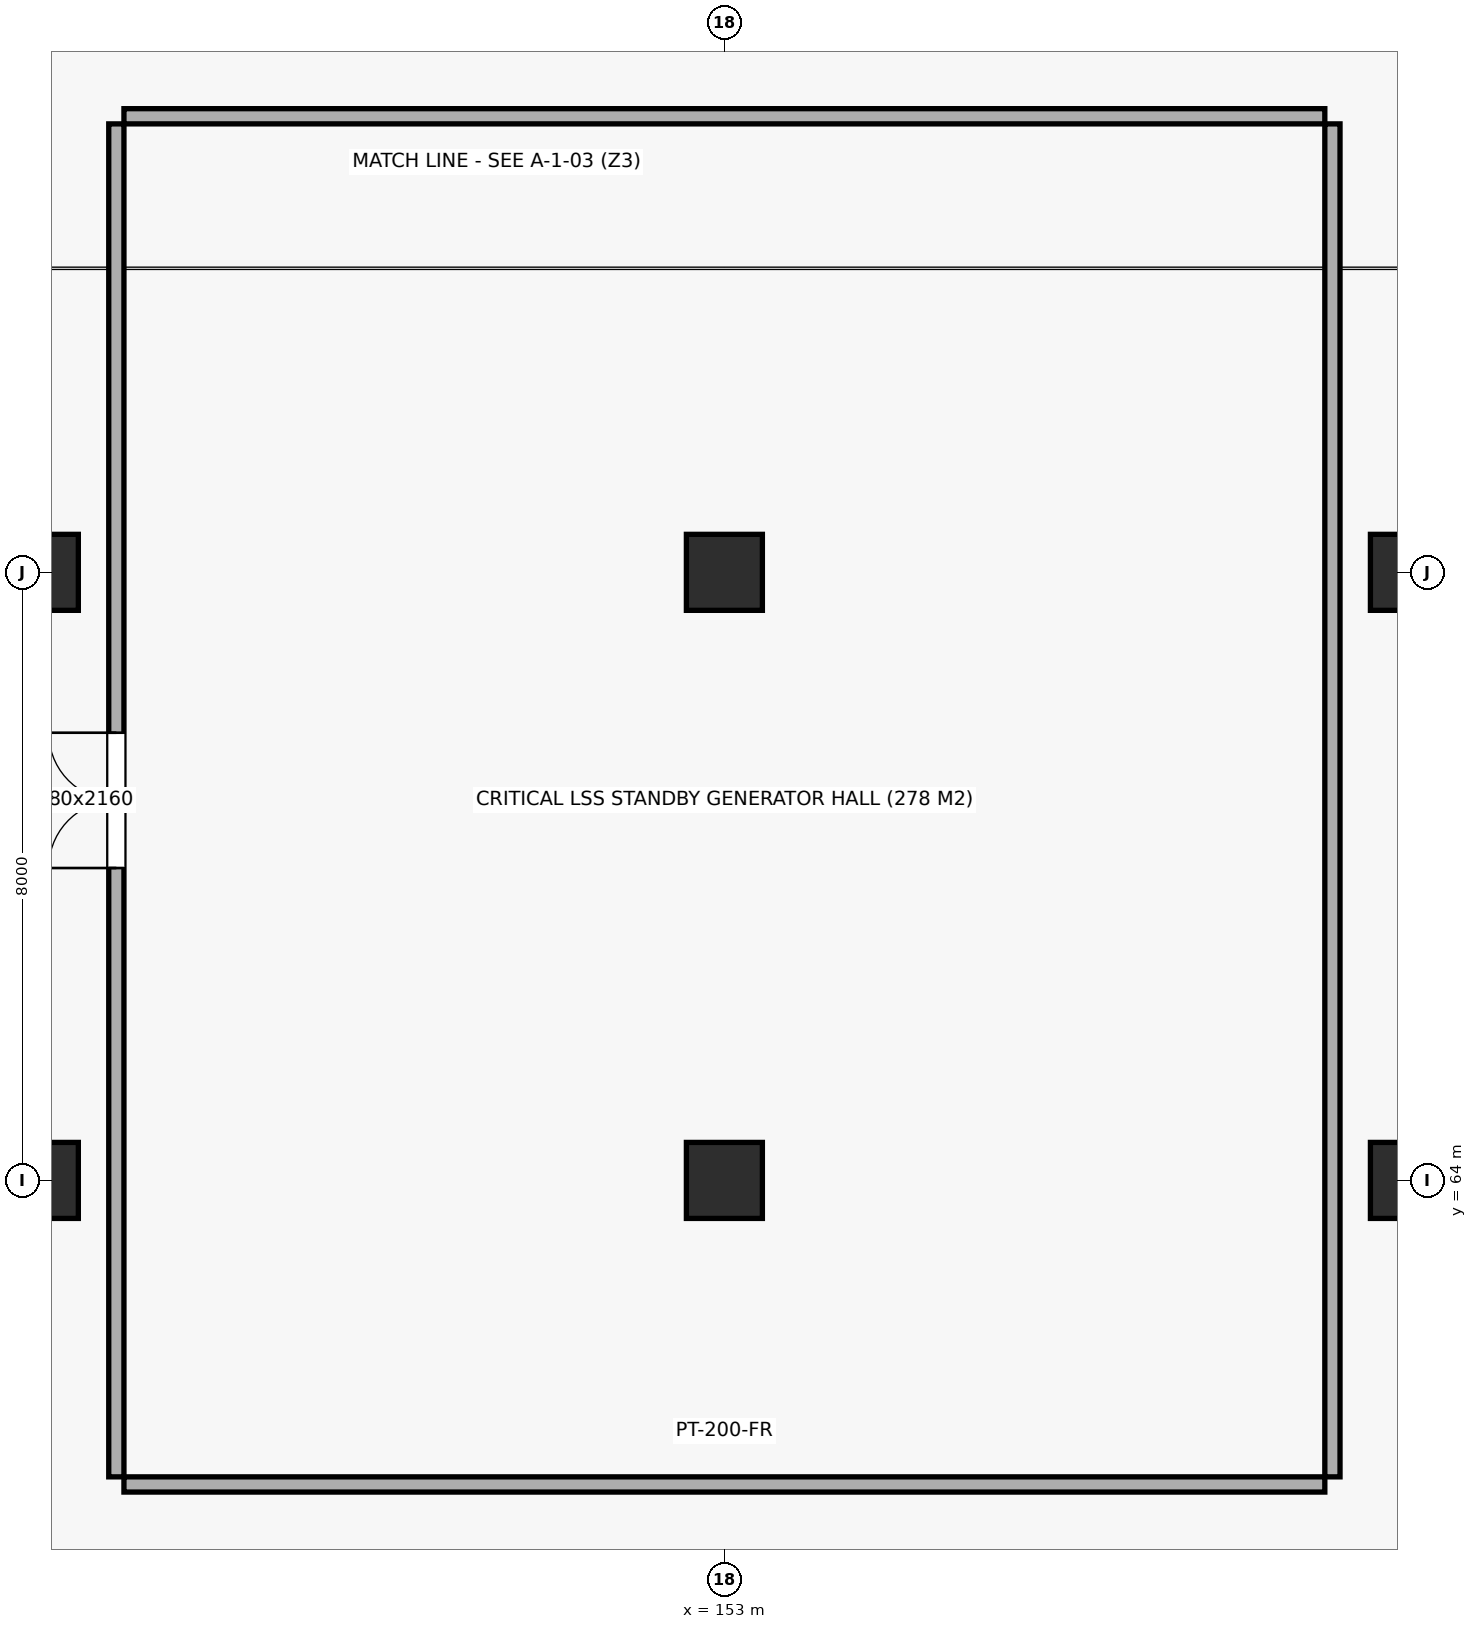
"""IFC4 building model, lengths in metres.
Left out: names, types, materials, properties, quantities, classifications, styles, units other than length and angle.
Written with IfcOpenShell. Run it as: python <this file> out.ifc"""

import sys

from ifc_helpers import new_model, si_unit, direction, frame, frame_2d, origin, origin_2d, place, context, subcontext, project, spatial, rectangle, extrude, element, fill, save


model = new_model("IFC4")
c1 = context("Model", 3, precision=1e-05, world=origin(), true_north=direction((0.0, 1.0)))
c2 = subcontext(c1, "Body", "Model", "MODEL_VIEW")
j1 = project(units=[si_unit("LENGTHUNIT", "METRE"), si_unit("PLANEANGLEUNIT", "RADIAN")], contexts=[c1])
p1 = place(None, origin())
s1 = spatial("IfcSite", under=j1, at=p1, CompositionType="ELEMENT")
p2 = place(p1, origin())
s2 = spatial("IfcBuilding", under=s1, at=p2, CompositionType="ELEMENT")
p3 = place(p2, frame((0.0, 0.0, -9.0)))
s3 = spatial("IfcBuildingStorey", under=s2, at=p3, CompositionType="ELEMENT", Elevation=-9.0)
for number, where, z_axis, x_axis in (
    (1, (144.0, 64.0, 0.0), (0.0, 0.0, 1.0), (1.0, 0.0, 0.0)),
    (2, (144.0, 72.0, 0.0), (0.0, 0.0, 1.0), (1.0, 0.0, 0.0)),
    (3, (153.0, 64.0, 0.0), (0.0, 0.0, 1.0), (1.0, 0.0, 0.0)),
    (4, (153.0, 72.0, 0.0), (0.0, 0.0, 1.0), (1.0, 0.0, 0.0)),
    (5, (162.0, 64.0, 0.0), (0.0, 0.0, 1.0), (1.0, 0.0, 0.0)),
    (6, (162.0, 72.0, 0.0), (0.0, 0.0, 1.0), (1.0, 0.0, 0.0)),
):
    element("IfcColumn", number, at=place(p3, frame(where, z_axis=z_axis, x_axis=x_axis)), inside=s3, PredefinedType="COLUMN", context=c2, shape_type="SweptSolid", body=[
        extrude(rectangle(XDim=1.0, YDim=1.0, at=origin_2d()), origin(), (0.0, 0.0, 1.0), 4.5),
    ])
p4 = place(p3, frame((145.1, 60.0, 0.0), z_axis=(0.0, 0.0, 1.0), x_axis=(1.0, 0.0, 0.0)))
e7 = element("IfcWall", 7, at=p4, inside=s3, PredefinedType="PARTITIONING", context=c2, shape_type="SweptSolid", body=[
    extrude(rectangle(XDim=15.8, YDim=0.2, at=frame_2d((7.9, 0.0))), origin(), (0.0, 0.0, 1.0), 3.6),
])
p5 = place(p3, frame((145.1, 78.0, 0.0), z_axis=(0.0, 0.0, 1.0), x_axis=(1.0, 0.0, 0.0)))
e8 = element("IfcWall", 8, at=p5, inside=s3, PredefinedType="PARTITIONING", context=c2, shape_type="SweptSolid", body=[
    extrude(rectangle(XDim=15.8, YDim=0.2, at=frame_2d((7.9, 0.0))), origin(), (0.0, 0.0, 1.0), 4.2),
])
p6 = place(p3, frame((145.0, 60.1, 0.0), z_axis=(0.0, 0.0, 1.0), x_axis=(0.0, 1.0, 0.0)))
e9 = element("IfcWall", 9, at=p6, inside=s3, PredefinedType="PARTITIONING", context=c2, shape_type="SweptSolid", body=[
    extrude(rectangle(XDim=17.8, YDim=0.2, at=frame_2d((8.9, 0.0))), origin(), (0.0, 0.0, 1.0), 4.2),
])
p7 = place(p6, frame((8.01, 0.0, 0.0)))
e10 = element("IfcOpeningElement", 10, at=p7, cuts=e9, PredefinedType="OPENING", context=c2, shape_type="SweptSolid", body=[
    extrude(rectangle(XDim=1.78, YDim=2.16, at=frame_2d((0.89, 1.08))), frame((0.0, 0.112, 0.0), z_axis=(0.0, -1.0, 0.0), x_axis=(1.0, 0.0, 0.0)), (0.0, 0.0, 1.0), 0.224),
])
p8 = place(p3, frame((161.0, 60.1, 0.0), z_axis=(0.0, 0.0, 1.0), x_axis=(0.0, 1.0, 0.0)))
e11 = element("IfcWall", 11, at=p8, inside=s3, PredefinedType="PARTITIONING", context=c2, shape_type="SweptSolid", body=[
    extrude(rectangle(XDim=17.8, YDim=0.2, at=frame_2d((8.9, 0.0))), origin(), (0.0, 0.0, 1.0), 4.2),
])
p9 = place(p7, origin())
e12 = element("IfcDoor", 12, at=p9, inside=s3, OperationType="DOUBLE_DOOR_SINGLE_SWING", PredefinedType="DOOR", context=c2, shape_type="SweptSolid", body=[
    extrude(rectangle(XDim=1.78, YDim=2.16, at=frame_2d((0.89, 1.08))), frame((0.0, 0.025, 0.0), z_axis=(0.0, -1.0, 0.0), x_axis=(1.0, 0.0, 0.0)), (0.0, 0.0, 1.0), 0.05),
])
fill(e10, e12)
save(model, sys.argv[1])
